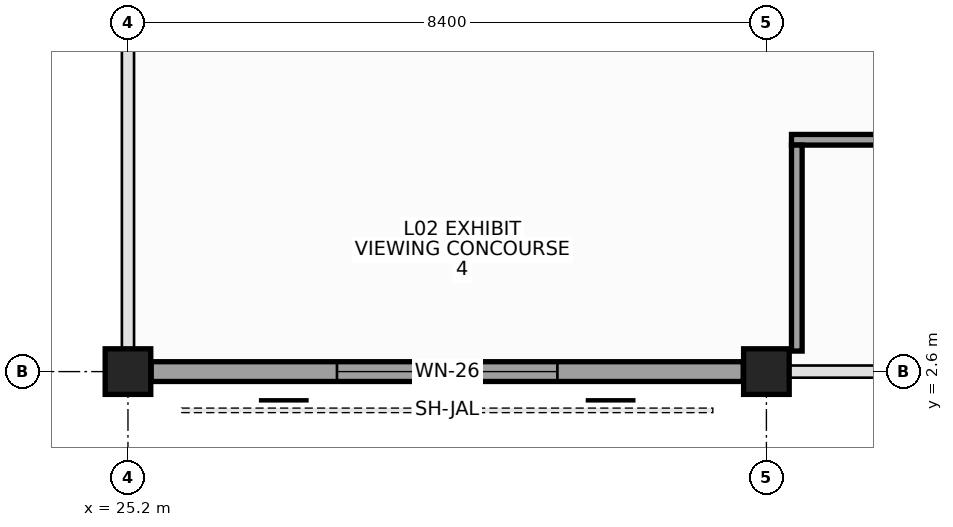
"""IFC4 building model, lengths in metres.
Left out: names, types, materials, properties, quantities, classifications, styles, units other than length and angle.
Written with IfcOpenShell. Run it as: python <this file> out.ifc"""

import sys

from ifc_helpers import new_model, si_unit, direction, frame, frame_2d, origin, origin_2d, place, context, subcontext, project, spatial, rectangle, extrude, element, fill, save


model = new_model("IFC4")
c1 = context("Model", 3, precision=1e-05, world=origin(), true_north=direction((0.0, 1.0)))
c2 = subcontext(c1, "Body", "Model", "MODEL_VIEW")
j1 = project(units=[si_unit("LENGTHUNIT", "METRE"), si_unit("PLANEANGLEUNIT", "RADIAN")], contexts=[c1])
p1 = place(None, origin())
s1 = spatial("IfcSite", under=j1, at=p1, CompositionType="ELEMENT")
p2 = place(p1, origin())
s2 = spatial("IfcBuilding", under=s1, at=p2, CompositionType="ELEMENT")
p3 = place(p2, frame((0.0, 0.0, 10.8)))
s3 = spatial("IfcBuildingStorey", under=s2, at=p3, CompositionType="ELEMENT", Elevation=10.8)
for number, where, z_axis, x_axis in (
    (1, (25.2, 2.6, 0.0), (0.0, 0.0, 1.0), (1.0, 0.0, 0.0)),
    (2, (33.6, 2.6, 0.0), (0.0, 0.0, 1.0), (1.0, 0.0, 0.0)),
):
    element("IfcColumn", number, at=place(p3, frame(where, z_axis=z_axis, x_axis=x_axis)), inside=s3, PredefinedType="COLUMN", context=c2, shape_type="SweptSolid", body=[
        extrude(rectangle(XDim=0.6, YDim=0.6, at=origin_2d()), origin(), (0.0, 0.0, 1.0), 4.8),
    ])
p4 = place(p3, frame((25.505, 2.6, 0.0), z_axis=(0.0, 0.0, 1.0), x_axis=(1.0, 0.0, 0.0)))
e3 = element("IfcWall", 3, at=p4, inside=s3, PredefinedType="STANDARD", context=c2, shape_type="SweptSolid", body=[
    extrude(rectangle(XDim=7.79, YDim=0.26, at=frame_2d((3.895, 0.0))), origin(), (0.0, 0.0, 1.0), 3.63),
])
p5 = place(p4, frame((2.445, 0.0, 0.95)))
e4 = element("IfcOpeningElement", 4, at=p5, cuts=e3, PredefinedType="OPENING", context=c2, shape_type="SweptSolid", body=[
    extrude(rectangle(XDim=2.9, YDim=1.9, at=frame_2d((1.45, 0.95))), frame((0.0, 0.14, 0.0), z_axis=(0.0, -1.0, 0.0), x_axis=(1.0, 0.0, 0.0)), (0.0, 0.0, 1.0), 0.28),
])
p6 = place(p3, frame((33.93, 5.65, 0.0), z_axis=(0.0, 0.0, 1.0), x_axis=(1.0, 0.0, 0.0)))
e5 = element("IfcWall", 5, at=p6, inside=s3, PredefinedType="PARTITIONING", context=c2, shape_type="SweptSolid", body=[
    extrude(rectangle(XDim=24.34, YDim=0.14, at=frame_2d((12.17, 0.0))), origin(), (0.0, 0.0, 1.0), 3.75),
])
p7 = place(p6, frame((11.31, 0.0, 0.0)))
e6 = element("IfcOpeningElement", 6, at=p7, cuts=e5, PredefinedType="OPENING", context=c2, shape_type="SweptSolid", body=[
    extrude(rectangle(XDim=1.72, YDim=2.35, at=frame_2d((0.86, 1.175))), frame((0.0, 0.08, 0.0), z_axis=(0.0, -1.0, 0.0), x_axis=(1.0, 0.0, 0.0)), (0.0, 0.0, 1.0), 0.16),
])
p8 = place(p6, frame((13.63, 0.0, 1.05)))
e7 = element("IfcOpeningElement", 7, at=p8, cuts=e5, PredefinedType="OPENING", context=c2, shape_type="SweptSolid", body=[
    extrude(rectangle(XDim=2.05, YDim=1.42, at=frame_2d((1.025, 0.71))), frame((0.0, 0.08, 0.0), z_axis=(0.0, -1.0, 0.0), x_axis=(1.0, 0.0, 0.0)), (0.0, 0.0, 1.0), 0.16),
])
p9 = place(p3, frame((34.0, 2.87, 0.0), z_axis=(0.0, 0.0, 1.0), x_axis=(0.0, 1.0, 0.0)))
e8 = element("IfcWall", 8, at=p9, inside=s3, PredefinedType="PARTITIONING", context=c2, shape_type="SweptSolid", body=[
    extrude(rectangle(XDim=2.71, YDim=0.14, at=frame_2d((1.355, 0.0))), origin(), (0.0, 0.0, 1.0), 3.63),
])
p10 = place(p5, origin())
e9 = element("IfcWindow", 9, at=p10, inside=s3, PartitioningType="SINGLE_PANEL", PredefinedType="WINDOW", context=c2, shape_type="SweptSolid", body=[
    extrude(rectangle(XDim=2.9, YDim=1.9, at=frame_2d((1.45, 0.95))), frame((0.0, 0.03, 0.0), z_axis=(0.0, -1.0, 0.0), x_axis=(1.0, 0.0, 0.0)), (0.0, 0.0, 1.0), 0.06),
])
fill(e4, e9)
save(model, sys.argv[1])
